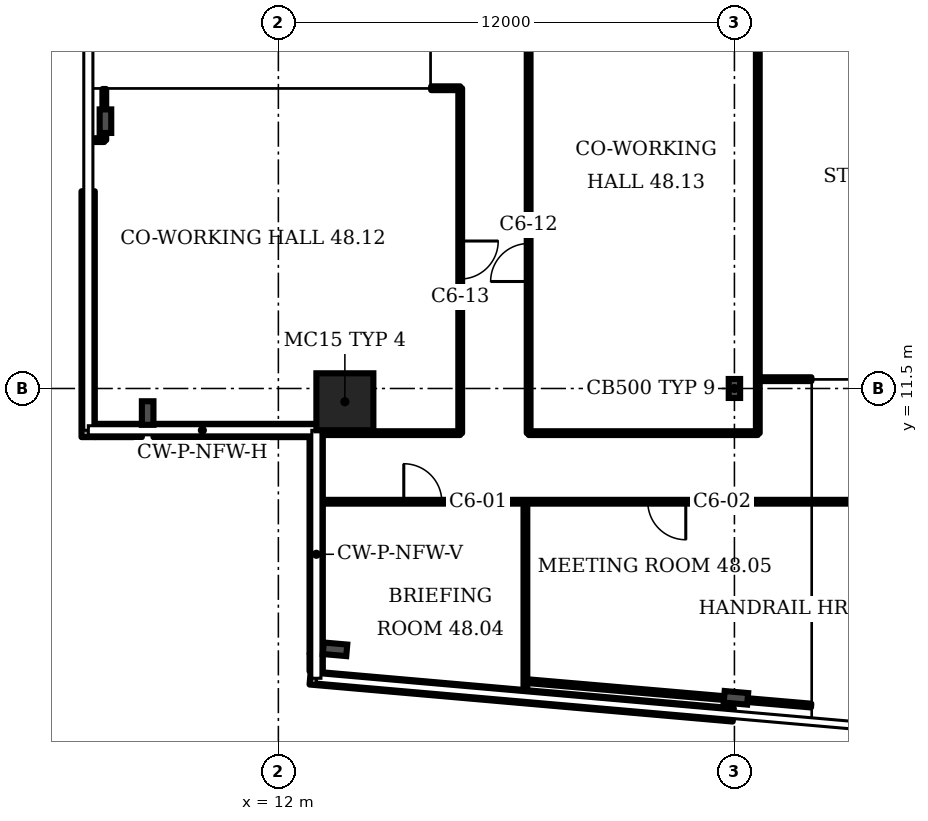
"""IFC4 building model, lengths in metres.
Left out: names, types, materials, properties, quantities, classifications, styles, units other than length and angle.
Written with IfcOpenShell. Run it as: python <this file> out.ifc"""

import sys

from ifc_helpers import new_model, si_unit, direction, frame, frame_2d, origin, origin_2d, place, context, subcontext, project, spatial, rectangle, i_section, extrude, element, fill, save


model = new_model("IFC4")
c1 = context("Model", 3, precision=1e-05, world=origin(), true_north=direction((0.0, 1.0)))
c2 = subcontext(c1, "Body", "Model", "MODEL_VIEW")
j1 = project(units=[si_unit("LENGTHUNIT", "METRE"), si_unit("PLANEANGLEUNIT", "RADIAN")], contexts=[c1])
p1 = place(None, origin())
s1 = spatial("IfcSite", under=j1, at=p1, CompositionType="ELEMENT")
p2 = place(p1, origin())
s2 = spatial("IfcBuilding", under=s1, at=p2, CompositionType="ELEMENT")
p3 = place(p2, frame((0.0, 0.0, 195.1)))
s3 = spatial("IfcBuildingStorey", under=s2, at=p3, CompositionType="ELEMENT", Elevation=195.1)
p4 = place(p3, frame((13.75, 11.15, 0.0), z_axis=(0.0, 0.0, 1.0), x_axis=(1.0, 0.0, 0.0)))
e1 = element("IfcColumn", 1, at=p4, inside=s3, PredefinedType="COLUMN", context=c2, shape_type="SweptSolid", body=[
    extrude(rectangle(XDim=1.5, YDim=1.5, at=origin_2d()), origin(), (0.0, 0.0, 1.0), 3.6),
])
for number, where, z_axis, x_axis in (
    (2, (13.491, 4.637, 0.0), (0.0, 0.0, 1.0), (-0.087, -0.996, 0.0)),
    (3, (24.039, 3.361, 0.0), (0.0, 0.0, 1.0), (-0.087, -0.996, 0.0)),
    (4, (7.45, 18.533, 0.0), (0.0, 0.0, 1.0), (-1.0, 0.0, 0.0)),
    (5, (8.561, 10.854, 0.0), (0.0, 0.0, 1.0), (-1.0, 0.0, 0.0)),
):
    element("IfcColumn", number, at=place(p3, frame(where, z_axis=z_axis, x_axis=x_axis)), inside=s3, PredefinedType="COLUMN", context=c2, shape_type="SweptSolid", body=[
        extrude(i_section(OverallWidth=0.305, OverallDepth=0.62, WebThickness=0.021, FlangeThickness=0.04, FilletRadius=0.027, at=origin_2d()), origin(), (0.0, 0.0, 1.0), 3.6),
    ])
p5 = place(p3, frame((24.0, 11.5, 0.0), z_axis=(0.0, 0.0, 1.0), x_axis=(1.0, 0.0, 0.0)))
e6 = element("IfcColumn", 6, at=p5, inside=s3, PredefinedType="COLUMN", context=c2, shape_type="SweptSolid", body=[
    extrude(i_section(OverallWidth=0.3, OverallDepth=0.5, WebThickness=0.014, FlangeThickness=0.028, FilletRadius=0.027, at=origin_2d()), origin(), (0.0, 0.0, 1.0), 3.6),
])
p6 = place(p3, frame((12.835, 3.885, 0.0), z_axis=(0.0, 0.0, 1.0), x_axis=(0.996199, -0.087154, 0.0)))
e7 = element("IfcWall", 7, at=p6, inside=s3, PredefinedType="SOLIDWALL", context=c2, shape_type="SweptSolid", body=[
    extrude(rectangle(XDim=11.177, YDim=0.35, at=frame_2d((5.588, 0.0))), origin(), (0.0, 0.0, 1.0), 1.0),
])
p7 = place(p3, frame((6.995, 16.69, 0.0), z_axis=(0.0, 0.0, 1.0), x_axis=(0.0, -1.0, 0.0)))
e8 = element("IfcWall", 8, at=p7, inside=s3, PredefinedType="SOLIDWALL", context=c2, shape_type="SweptSolid", body=[
    extrude(rectangle(XDim=6.47, YDim=0.35, at=frame_2d((3.235, 0.0))), origin(), (0.0, 0.0, 1.0), 1.0),
])
p8 = place(p3, frame((7.17, 10.395, 0.0), z_axis=(0.0, 0.0, 1.0), x_axis=(1.0, 0.0, 0.0)))
e9 = element("IfcWall", 9, at=p8, inside=s3, PredefinedType="SOLIDWALL", context=c2, shape_type="SweptSolid", body=[
    extrude(rectangle(XDim=1.238, YDim=0.35, at=frame_2d((0.619, 0.0))), origin(), (0.0, 0.0, 1.0), 1.0),
])
p9 = place(p3, frame((8.713, 10.395, 0.0), z_axis=(0.0, 0.0, 1.0), x_axis=(1.0, 0.0, 0.0)))
e10 = element("IfcWall", 10, at=p9, inside=s3, PredefinedType="SOLIDWALL", context=c2, shape_type="SweptSolid", body=[
    extrude(rectangle(XDim=4.287, YDim=0.35, at=frame_2d((2.143, 0.0))), origin(), (0.0, 0.0, 1.0), 1.0),
])
p10 = place(p3, frame((12.995, 10.22, 0.0), z_axis=(0.0, 0.0, 1.0), x_axis=(0.0, -1.0, 0.0)))
e11 = element("IfcWall", 11, at=p10, inside=s3, PredefinedType="SOLIDWALL", context=c2, shape_type="SweptSolid", body=[
    extrude(rectangle(XDim=5.693, YDim=0.35, at=frame_2d((2.847, 0.0))), origin(), (0.0, 0.0, 1.0), 1.0),
])
p11 = place(p3, frame((12.995, 4.512, 0.0), z_axis=(0.0, 0.0, 1.0), x_axis=(0.0, -1.0, 0.0)))
e12 = element("IfcWall", 12, at=p11, inside=s3, PredefinedType="SOLIDWALL", context=c2, shape_type="SweptSolid", body=[
    extrude(rectangle(XDim=0.454, YDim=0.35, at=frame_2d((0.227, 0.0))), origin(), (0.0, 0.0, 1.0), 1.0),
])
p12 = place(p3, frame((7.02, 18.035, 0.0), z_axis=(0.0, 0.0, 1.0), x_axis=(1.0, 0.0, 0.0)))
e13 = element("IfcWall", 13, at=p12, inside=s3, PredefinedType="PARTITIONING", context=c2, shape_type="SweptSolid", body=[
    extrude(rectangle(XDim=0.4, YDim=0.1, at=frame_2d((0.2, 0.0))), origin(), (0.0, 0.0, 1.0), 3.2),
])
p13 = place(p3, frame((7.42, 18.035, 0.0), z_axis=(0.0, 0.0, 1.0), x_axis=(0.0, 1.0, 0.0)))
e14 = element("IfcWall", 14, at=p13, inside=s3, PredefinedType="PARTITIONING", context=c2, shape_type="SweptSolid", body=[
    extrude(rectangle(XDim=1.345, YDim=0.1, at=frame_2d((0.672, 0.0))), origin(), (0.0, 0.0, 1.0), 2.58),
])
p14 = place(p3, frame((13.02, 8.52, 0.0), z_axis=(0.0, 0.0, 1.0), x_axis=(1.0, 0.0, 0.0)))
e15 = element("IfcWall", 15, at=p14, inside=s3, PredefinedType="PARTITIONING", context=c2, shape_type="SweptSolid", body=[
    extrude(rectangle(XDim=14.344, YDim=0.1, at=frame_2d((7.172, 0.0))), origin(), (0.0, 0.0, 1.0), 3.2),
])
p15 = place(p14, frame((2.28, 0.0, 0.0)))
e16 = element("IfcOpeningElement", 16, at=p15, cuts=e15, PredefinedType="OPENING", context=c2, shape_type="SweptSolid", body=[
    extrude(rectangle(XDim=1.0, YDim=2.1, at=frame_2d((0.5, 1.05))), frame((0.0, 0.06, 0.0), z_axis=(0.0, -1.0, 0.0), x_axis=(1.0, 0.0, 0.0)), (0.0, 0.0, 1.0), 0.12),
])
p16 = place(p14, frame((8.7, 0.0, 0.0)))
e17 = element("IfcOpeningElement", 17, at=p16, cuts=e15, PredefinedType="OPENING", context=c2, shape_type="SweptSolid", body=[
    extrude(rectangle(XDim=1.0, YDim=2.1, at=frame_2d((0.5, 1.05))), frame((0.0, 0.06, 0.0), z_axis=(0.0, -1.0, 0.0), x_axis=(1.0, 0.0, 0.0)), (0.0, 0.0, 1.0), 0.12),
])
p17 = place(p3, frame((13.02, 10.325, 0.0), z_axis=(0.0, 0.0, 1.0), x_axis=(1.0, 0.0, 0.0)))
e18 = element("IfcWall", 18, at=p17, inside=s3, PredefinedType="PARTITIONING", context=c2, shape_type="SweptSolid", body=[
    extrude(rectangle(XDim=3.765, YDim=0.1, at=frame_2d((1.882, 0.0))), origin(), (0.0, 0.0, 1.0), 3.2),
])
p18 = place(p3, frame((16.02, 19.4, 0.0), z_axis=(0.0, 0.0, 1.0), x_axis=(1.0, 0.0, 0.0)))
e19 = element("IfcWall", 19, at=p18, inside=s3, PredefinedType="PARTITIONING", context=c2, shape_type="SweptSolid", body=[
    extrude(rectangle(XDim=0.765, YDim=0.1, at=frame_2d((0.382, 0.0))), origin(), (0.0, 0.0, 1.0), 3.2),
])
p19 = place(p3, frame((16.785, 10.325, 0.0), z_axis=(0.0, 0.0, 1.0), x_axis=(0.0, 1.0, 0.0)))
e20 = element("IfcWall", 20, at=p19, inside=s3, PredefinedType="PARTITIONING", context=c2, shape_type="SweptSolid", body=[
    extrude(rectangle(XDim=9.075, YDim=0.1, at=frame_2d((4.538, 0.0))), origin(), (0.0, 0.0, 1.0), 3.2),
])
p20 = place(p19, frame((4.055, 0.0, 0.0)))
e21 = element("IfcOpeningElement", 21, at=p20, cuts=e20, PredefinedType="OPENING", context=c2, shape_type="SweptSolid", body=[
    extrude(rectangle(XDim=1.0, YDim=2.1, at=frame_2d((0.5, 1.05))), frame((0.0, 0.06, 0.0), z_axis=(0.0, -1.0, 0.0), x_axis=(1.0, 0.0, 0.0)), (0.0, 0.0, 1.0), 0.12),
])
p21 = place(p3, frame((18.5, 3.425, 0.0), z_axis=(0.0, 0.0, 1.0), x_axis=(0.0, 1.0, 0.0)))
e22 = element("IfcWall", 22, at=p21, inside=s3, PredefinedType="PARTITIONING", context=c2, shape_type="SweptSolid", body=[
    extrude(rectangle(XDim=5.095, YDim=0.1, at=frame_2d((2.547, 0.0))), origin(), (0.0, 0.0, 1.0), 2.58),
])
p22 = place(p3, frame((18.585, 10.325, 0.0), z_axis=(0.0, 0.0, 1.0), x_axis=(0.0, 1.0, 0.0)))
e23 = element("IfcWall", 23, at=p22, inside=s3, PredefinedType="PARTITIONING", context=c2, shape_type="SweptSolid", body=[
    extrude(rectangle(XDim=10.21, YDim=0.1, at=frame_2d((5.105, 0.0))), origin(), (0.0, 0.0, 1.0), 3.2),
])
p23 = place(p22, frame((3.99, 0.0, 0.0)))
e24 = element("IfcOpeningElement", 24, at=p23, cuts=e23, PredefinedType="OPENING", context=c2, shape_type="SweptSolid", body=[
    extrude(rectangle(XDim=1.0, YDim=2.1, at=frame_2d((0.5, 1.05))), frame((0.0, 0.06, 0.0), z_axis=(0.0, -1.0, 0.0), x_axis=(1.0, 0.0, 0.0)), (0.0, 0.0, 1.0), 0.12),
])
p24 = place(p3, frame((18.585, 10.325, 0.0), z_axis=(0.0, 0.0, 1.0), x_axis=(1.0, 0.0, 0.0)))
e25 = element("IfcWall", 25, at=p24, inside=s3, PredefinedType="PARTITIONING", context=c2, shape_type="SweptSolid", body=[
    extrude(rectangle(XDim=6.03, YDim=0.1, at=frame_2d((3.015, 0.0))), origin(), (0.0, 0.0, 1.0), 3.2),
])
p25 = place(p3, frame((24.615, 10.325, 0.0), z_axis=(0.0, 0.0, 1.0), x_axis=(0.0, 1.0, 0.0)))
e26 = element("IfcWall", 26, at=p25, inside=s3, PredefinedType="PARTITIONING", context=c2, shape_type="SweptSolid", body=[
    extrude(rectangle(XDim=10.21, YDim=0.1, at=frame_2d((5.105, 0.0))), origin(), (0.0, 0.0, 1.0), 3.2),
])
p26 = place(p3, frame((24.62, 11.745, 0.0), z_axis=(0.0, 0.0, 1.0), x_axis=(1.0, 0.0, 0.0)))
e27 = element("IfcWall", 27, at=p26, inside=s3, PredefinedType="PARTITIONING", context=c2, shape_type="SweptSolid", body=[
    extrude(rectangle(XDim=1.407, YDim=0.1, at=frame_2d((0.703, 0.0))), origin(), (0.0, 0.0, 1.0), 3.2),
])
p27 = place(p3, frame((26.019, 3.157, 0.0), z_axis=(0.0, 0.0, 1.0), x_axis=(-0.996318, 0.085696, 0.0)))
e28 = element("IfcWall", 28, at=p27, inside=s3, PredefinedType="PARTITIONING", context=c2, shape_type="SweptSolid", body=[
    extrude(rectangle(XDim=7.507, YDim=0.1, at=frame_2d((3.753, 0.0))), origin(), (0.0, 0.0, 1.0), 2.58),
])
p28 = place(p15, origin())
e29 = element("IfcDoor", 29, at=p28, inside=s3, OperationType="SINGLE_SWING_LEFT", PredefinedType="DOOR", context=c2, shape_type="SweptSolid", body=[
    extrude(rectangle(XDim=1.0, YDim=2.1, at=frame_2d((0.5, 1.05))), frame((0.0, 0.025, 0.0), z_axis=(0.0, -1.0, 0.0), x_axis=(1.0, 0.0, 0.0)), (0.0, 0.0, 1.0), 0.05),
])
fill(e16, e29)
p29 = place(p16, origin())
e30 = element("IfcDoor", 30, at=p29, inside=s3, OperationType="SINGLE_SWING_RIGHT", PredefinedType="DOOR", context=c2, shape_type="SweptSolid", body=[
    extrude(rectangle(XDim=1.0, YDim=2.1, at=frame_2d((0.5, 1.05))), frame((0.0, 0.025, 0.0), z_axis=(0.0, -1.0, 0.0), x_axis=(1.0, 0.0, 0.0)), (0.0, 0.0, 1.0), 0.05),
])
fill(e17, e30)
p30 = place(p23, origin())
e31 = element("IfcDoor", 31, at=p30, inside=s3, OperationType="SINGLE_SWING_LEFT", PredefinedType="DOOR", context=c2, shape_type="SweptSolid", body=[
    extrude(rectangle(XDim=1.0, YDim=2.1, at=frame_2d((0.5, 1.05))), frame((0.0, 0.025, 0.0), z_axis=(0.0, -1.0, 0.0), x_axis=(1.0, 0.0, 0.0)), (0.0, 0.0, 1.0), 0.05),
])
fill(e24, e31)
p31 = place(p20, origin())
e32 = element("IfcDoor", 32, at=p31, inside=s3, OperationType="SINGLE_SWING_RIGHT", PredefinedType="DOOR", context=c2, shape_type="SweptSolid", body=[
    extrude(rectangle(XDim=1.0, YDim=2.1, at=frame_2d((0.5, 1.05))), frame((0.0, 0.025, 0.0), z_axis=(0.0, -1.0, 0.0), x_axis=(1.0, 0.0, 0.0)), (0.0, 0.0, 1.0), 0.05),
])
fill(e21, e32)
save(model, sys.argv[1])
